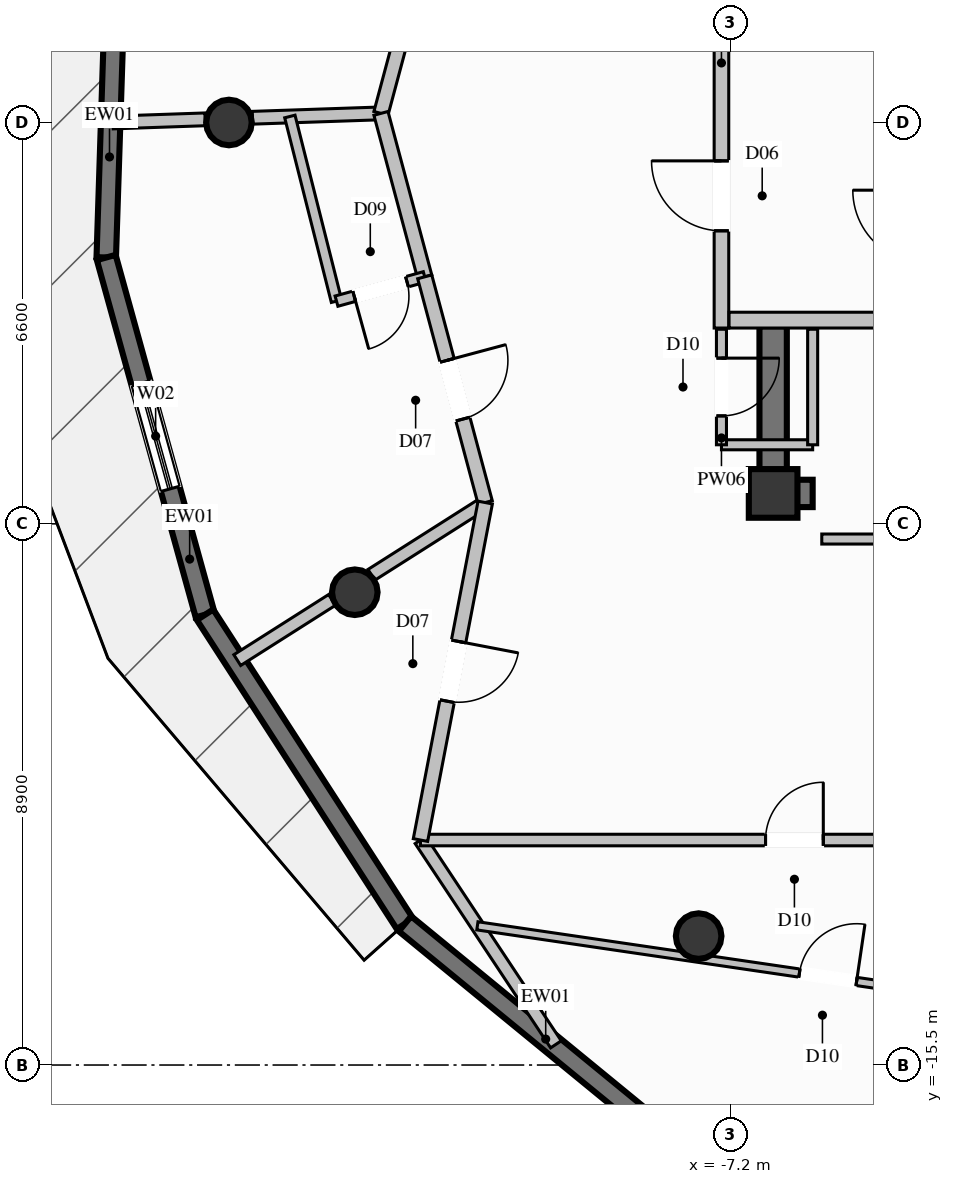
"""IFC4 building model, lengths in metres.
Left out: names, types, materials, properties, quantities, classifications, styles, units other than length and angle.
Written with IfcOpenShell. Run it as: python <this file> out.ifc"""

import sys

from ifc_helpers import new_model, si_unit, direction, frame, frame_2d, origin, origin_2d, place, context, subcontext, project, spatial, rectangle, circle, extrude, element, fill, save


model = new_model("IFC4")
c1 = context("Model", 3, precision=1e-05, world=origin(), true_north=direction((0.0, 1.0)))
c2 = subcontext(c1, "Body", "Model", "MODEL_VIEW")
j1 = project(units=[si_unit("LENGTHUNIT", "METRE"), si_unit("PLANEANGLEUNIT", "RADIAN")], contexts=[c1])
p1 = place(None, origin())
s1 = spatial("IfcSite", under=j1, at=p1, CompositionType="ELEMENT")
p2 = place(p1, origin())
s2 = spatial("IfcBuilding", under=s1, at=p2, CompositionType="ELEMENT")
p3 = place(p2, frame((0.0, 0.0, 258.2)))
s3 = spatial("IfcBuildingStorey", under=s2, at=p3, CompositionType="ELEMENT", Elevation=258.2)
p4 = place(p3, frame((-6.5, -6.1, 0.0), z_axis=(0.0, 0.0, 1.0), x_axis=(1.0, 0.0, 0.0)))
e1 = element("IfcColumn", 1, at=p4, inside=s3, PredefinedType="COLUMN", context=c2, shape_type="SweptSolid", body=[
    extrude(rectangle(XDim=0.8, YDim=0.8, at=origin_2d()), origin(), (0.0, 0.0, 1.0), 3.8),
])
p5 = place(p3, frame((-6.275, -6.1, 0.0), z_axis=(0.0, 0.0, 1.0), x_axis=(1.0, 0.0, 0.0)))
e2 = element("IfcWall", 2, at=p5, inside=s3, PredefinedType="SHEAR", context=c2, shape_type="SweptSolid", body=[
    extrude(rectangle(XDim=0.425, YDim=0.45, at=frame_2d((0.212, 0.0))), origin(), (0.0, 0.0, 1.0), 3.8),
])
p6 = place(p3, frame((-6.5, -6.325, 0.0), z_axis=(0.0, 0.0, 1.0), x_axis=(0.0, 1.0, 0.0)))
e3 = element("IfcWall", 3, at=p6, inside=s3, PredefinedType="SHEAR", context=c2, shape_type="SweptSolid", body=[
    extrude(rectangle(XDim=2.975, YDim=0.45, at=frame_2d((1.487, 0.0))), origin(), (0.0, 0.0, 1.0), 3.8),
])
for number, where, z_axis, x_axis in (
    (4, (-15.45, 0.0, 0.0), (0.0, 0.0, 1.0), (1.0, 0.0, 0.0)),
    (5, (-13.38, -7.725, 0.0), (0.0, 0.0, 1.0), (1.0, 0.0, 0.0)),
    (6, (-7.725, -13.38, 0.0), (0.0, 0.0, 1.0), (1.0, 0.0, 0.0)),
):
    element("IfcColumn", number, at=place(p3, frame(where, z_axis=z_axis, x_axis=x_axis)), inside=s3, PredefinedType="COLUMN", context=c2, shape_type="SweptSolid", body=[
        extrude(circle(Radius=0.375, at=origin_2d()), origin(), (0.0, 0.0, 1.0), 3.8),
    ])
p7 = place(p3, frame((-17.468, -2.22, 0.0), z_axis=(0.0, 0.0, 1.0), x_axis=(0.032483949851, 0.999472257245, 0.0)))
e7 = element("IfcWall", 7, at=p7, inside=s3, PredefinedType="SOLIDWALL", context=c2, shape_type="SweptSolid", body=[
    extrude(rectangle(XDim=6.095, YDim=0.32, at=frame_2d((3.048, 0.0))), origin(), (0.0, 0.0, 1.0), 3.57),
])
p8 = place(p7, frame((3.559, 0.0, 0.0)))
e8 = element("IfcOpeningElement", 8, at=p8, cuts=e7, PredefinedType="OPENING", context=c2, shape_type="SweptSolid", body=[
    extrude(rectangle(XDim=1.1, YDim=2.2, at=frame_2d((0.55, 1.1))), frame((0.0, 0.17, 0.0), z_axis=(0.0, -1.0, 0.0), x_axis=(1.0, 0.0, 0.0)), (0.0, 0.0, 1.0), 0.34),
])
p9 = place(p3, frame((-15.843, -8.095, 0.0), z_axis=(0.0, 0.0, 1.0), x_axis=(-0.266586054538, 0.963811120254, 0.0)))
e9 = element("IfcWall", 9, at=p9, inside=s3, PredefinedType="SOLIDWALL", context=c2, shape_type="SweptSolid", body=[
    extrude(rectangle(XDim=6.096, YDim=0.32, at=frame_2d((3.048, 0.0))), origin(), (0.0, 0.0, 1.0), 3.57),
])
p10 = place(p9, frame((2.148, 0.0, 0.35)))
e10 = element("IfcOpeningElement", 10, at=p10, cuts=e9, PredefinedType="OPENING", context=c2, shape_type="SweptSolid", body=[
    extrude(rectangle(XDim=1.8, YDim=2.6, at=frame_2d((0.9, 1.3))), frame((0.0, 0.17, 0.0), z_axis=(0.0, -1.0, 0.0), x_axis=(1.0, 0.0, 0.0)), (0.0, 0.0, 1.0), 0.34),
])
p11 = place(p3, frame((-12.555, -13.177, 0.0), z_axis=(0.0, 0.0, 1.0), x_axis=(-0.543217830049, 0.839591799101, 0.0)))
e11 = element("IfcWall", 11, at=p11, inside=s3, PredefinedType="SOLIDWALL", context=c2, shape_type="SweptSolid", body=[
    extrude(rectangle(XDim=6.053, YDim=0.32, at=frame_2d((3.026, 0.0))), origin(), (0.0, 0.0, 1.0), 3.57),
])
p12 = place(p3, frame((-7.926, -16.97, 0.0), z_axis=(0.0, 0.0, 1.0), x_axis=(-0.773491773729, 0.633806339486, 0.0)))
e12 = element("IfcWall", 12, at=p12, inside=s3, PredefinedType="SOLIDWALL", context=c2, shape_type="SweptSolid", body=[
    extrude(rectangle(XDim=5.984, YDim=0.32, at=frame_2d((2.992, 0.0))), origin(), (0.0, 0.0, 1.0), 3.57),
])
p13 = place(p3, frame((-7.35, -3.38, 0.0), z_axis=(0.0, 0.0, 1.0), x_axis=(0.0, 1.0, 0.0)))
e13 = element("IfcWall", 13, at=p13, inside=s3, PredefinedType="PARTITIONING", context=c2, shape_type="SweptSolid", body=[
    extrude(rectangle(XDim=5.72, YDim=0.24, at=frame_2d((2.86, 0.0))), origin(), (0.0, 0.0, 1.0), 2.655),
])
p14 = place(p13, frame((1.599, 0.0, 0.0)))
e14 = element("IfcOpeningElement", 14, at=p14, cuts=e13, PredefinedType="OPENING", context=c2, shape_type="SweptSolid", body=[
    extrude(rectangle(XDim=1.15, YDim=2.2, at=frame_2d((0.575, 1.1))), frame((0.0, 0.13, 0.0), z_axis=(0.0, -1.0, 0.0), x_axis=(1.0, 0.0, 0.0)), (0.0, 0.0, 1.0), 0.26),
])
p15 = place(p3, frame((-7.225, -3.25, 0.0), z_axis=(0.0, 0.0, 1.0), x_axis=(1.0, 0.0, 0.0)))
e15 = element("IfcWall", 15, at=p15, inside=s3, PredefinedType="PARTITIONING", context=c2, shape_type="SweptSolid", body=[
    extrude(rectangle(XDim=3.095, YDim=0.26, at=frame_2d((1.548, 0.0))), origin(), (0.0, 0.0, 1.0), 3.57),
])
p16 = place(p3, frame((-7.35, -5.3, 0.0), z_axis=(0.0, 0.0, 1.0), x_axis=(1.0, 0.0, 0.0)))
e16 = element("IfcWall", 16, at=p16, inside=s3, PredefinedType="PARTITIONING", context=c2, shape_type="SweptSolid", body=[
    extrude(rectangle(XDim=1.5, YDim=0.165, at=frame_2d((0.75, 0.0))), origin(), (0.0, 0.0, 1.0), 2.655),
])
p17 = place(p3, frame((-5.85, -5.3, 0.0), z_axis=(0.0, 0.0, 1.0), x_axis=(0.0, 1.0, 0.0)))
e17 = element("IfcWall", 17, at=p17, inside=s3, PredefinedType="PARTITIONING", context=c2, shape_type="SweptSolid", body=[
    extrude(rectangle(XDim=1.9, YDim=0.165, at=frame_2d((0.95, 0.0))), origin(), (0.0, 0.0, 1.0), 2.655),
])
p18 = place(p3, frame((-7.35, -3.4, 0.0), z_axis=(0.0, 0.0, 1.0), x_axis=(0.0, -1.0, 0.0)))
e18 = element("IfcWall", 18, at=p18, inside=s3, PredefinedType="PARTITIONING", context=c2, shape_type="SweptSolid", body=[
    extrude(rectangle(XDim=1.9, YDim=0.165, at=frame_2d((0.95, 0.0))), origin(), (0.0, 0.0, 1.0), 3.57),
])
p19 = place(p18, frame((0.475, 0.0, 0.0)))
e19 = element("IfcOpeningElement", 19, at=p19, cuts=e18, PredefinedType="OPENING", context=c2, shape_type="SweptSolid", body=[
    extrude(rectangle(XDim=0.95, YDim=2.1, at=frame_2d((0.475, 1.05))), frame((0.0, 0.093, 0.0), z_axis=(0.0, -1.0, 0.0), x_axis=(1.0, 0.0, 0.0)), (0.0, 0.0, 1.0), 0.185),
])
p20 = place(p3, frame((-5.7, -6.85, 0.0), z_axis=(0.0, 0.0, 1.0), x_axis=(1.0, 0.0, 0.0)))
e20 = element("IfcWall", 20, at=p20, inside=s3, PredefinedType="PARTITIONING", context=c2, shape_type="SweptSolid", body=[
    extrude(rectangle(XDim=6.55, YDim=0.165, at=frame_2d((3.275, 0.0))), origin(), (0.0, 0.0, 1.0), 2.655),
])
p21 = place(p20, frame((2.8, 0.0, 0.0)))
e21 = element("IfcOpeningElement", 21, at=p21, cuts=e20, PredefinedType="OPENING", context=c2, shape_type="SweptSolid", body=[
    extrude(rectangle(XDim=0.95, YDim=2.1, at=frame_2d((0.475, 1.05))), frame((0.0, 0.093, 0.0), z_axis=(0.0, -1.0, 0.0), x_axis=(1.0, 0.0, 0.0)), (0.0, 0.0, 1.0), 0.185),
])
p22 = place(p3, frame((-12.95, 0.15, 0.0), z_axis=(0.0, 0.0, 1.0), x_axis=(-0.999419634364, -0.034064562927, 0.0)))
e22 = element("IfcWall", 22, at=p22, inside=s3, PredefinedType="PARTITIONING", context=c2, shape_type="SweptSolid", body=[
    extrude(rectangle(XDim=2.114, YDim=0.21, at=frame_2d((1.057, 0.0))), origin(), (0.0, 0.0, 1.0), 3.57),
])
p23 = place(p3, frame((-15.842, 0.052, 0.0), z_axis=(0.0, 0.0, 1.0), x_axis=(-0.999410584372, -0.034329052487, 0.0)))
e23 = element("IfcWall", 23, at=p23, inside=s3, PredefinedType="PARTITIONING", context=c2, shape_type="SweptSolid", body=[
    extrude(rectangle(XDim=1.515, YDim=0.21, at=frame_2d((0.757, 0.0))), origin(), (0.0, 0.0, 1.0), 3.57),
])
p24 = place(p3, frame((-11.235, -6.25, 0.0), z_axis=(0.0, 0.0, 1.0), x_axis=(-0.844109998161, -0.536170039265, 0.0)))
e24 = element("IfcWall", 24, at=p24, inside=s3, PredefinedType="PARTITIONING", context=c2, shape_type="SweptSolid", body=[
    extrude(rectangle(XDim=2.218, YDim=0.21, at=frame_2d((1.109, 0.0))), origin(), (0.0, 0.0, 1.0), 3.085),
])
p25 = place(p3, frame((-13.754, -7.851, 0.0), z_axis=(0.0, 0.0, 1.0), x_axis=(-0.844189076995, -0.536045522583, 0.0)))
e25 = element("IfcWall", 25, at=p25, inside=s3, PredefinedType="PARTITIONING", context=c2, shape_type="SweptSolid", body=[
    extrude(rectangle(XDim=1.847, YDim=0.21, at=frame_2d((0.923, 0.0))), origin(), (0.0, 0.0, 1.0), 3.57),
])
p26 = place(p3, frame((-11.955, 3.862, 0.0), z_axis=(0.0, 0.0, 1.0), x_axis=(-0.258868389222, -0.965912603221, 0.0)))
e26 = element("IfcWall", 26, at=p26, inside=s3, PredefinedType="PARTITIONING", context=c2, shape_type="SweptSolid", body=[
    extrude(rectangle(XDim=3.843, YDim=0.24, at=frame_2d((1.922, 0.0))), origin(), (0.0, 0.0, 1.0), 3.57),
])
p27 = place(p26, frame((1.422, 0.0, 0.0)))
e27 = element("IfcOpeningElement", 27, at=p27, cuts=e26, PredefinedType="OPENING", context=c2, shape_type="SweptSolid", body=[
    extrude(rectangle(XDim=1.0, YDim=2.2, at=frame_2d((0.5, 1.1))), frame((0.0, 0.13, 0.0), z_axis=(0.0, -1.0, 0.0), x_axis=(1.0, 0.0, 0.0)), (0.0, 0.0, 1.0), 0.26),
])
p28 = place(p3, frame((-12.95, 0.15, 0.0), z_axis=(0.0, 0.0, 1.0), x_axis=(0.258727314432, -0.96595040078, 0.0)))
e28 = element("IfcWall", 28, at=p28, inside=s3, PredefinedType="PARTITIONING", context=c2, shape_type="SweptSolid", body=[
    extrude(rectangle(XDim=2.783, YDim=0.24, at=frame_2d((1.391, 0.0))), origin(), (0.0, 0.0, 1.0), 3.57),
])
p29 = place(p3, frame((-14.448, 0.099, 0.0), z_axis=(0.0, 0.0, 1.0), x_axis=(0.244882234228, -0.969552830618, 0.0)))
e29 = element("IfcWall", 29, at=p29, inside=s3, PredefinedType="PLUMBINGWALL", context=c2, shape_type="SweptSolid", body=[
    extrude(rectangle(XDim=3.133, YDim=0.175, at=frame_2d((1.566, 0.0))), origin(), (0.0, 0.0, 1.0), 3.57),
])
p30 = place(p3, frame((-12.23, -2.538, 0.0), z_axis=(0.0, 0.0, 1.0), x_axis=(-0.964052819731, -0.265710671162, 0.0)))
e30 = element("IfcWall", 30, at=p30, inside=s3, PredefinedType="PLUMBINGWALL", context=c2, shape_type="SweptSolid", body=[
    extrude(rectangle(XDim=1.505, YDim=0.175, at=frame_2d((0.752, 0.0))), origin(), (0.0, 0.0, 1.0), 3.57),
])
p31 = place(p30, frame((0.303, 0.0, 0.0)))
e31 = element("IfcOpeningElement", 31, at=p31, cuts=e30, PredefinedType="OPENING", context=c2, shape_type="SweptSolid", body=[
    extrude(rectangle(XDim=0.9, YDim=2.1, at=frame_2d((0.45, 1.05))), frame((0.0, 0.098, 0.0), z_axis=(0.0, -1.0, 0.0), x_axis=(1.0, 0.0, 0.0)), (0.0, 0.0, 1.0), 0.195),
])
p32 = place(p3, frame((-12.23, -2.538, 0.0), z_axis=(0.0, 0.0, 1.0), x_axis=(0.258884274469, -0.965908345772, 0.0)))
e32 = element("IfcWall", 32, at=p32, inside=s3, PredefinedType="PARTITIONING", context=c2, shape_type="SweptSolid", body=[
    extrude(rectangle(XDim=3.843, YDim=0.24, at=frame_2d((1.921, 0.0))), origin(), (0.0, 0.0, 1.0), 3.57),
])
p33 = place(p32, frame((1.422, 0.0, 0.0)))
e33 = element("IfcOpeningElement", 33, at=p33, cuts=e32, PredefinedType="OPENING", context=c2, shape_type="SweptSolid", body=[
    extrude(rectangle(XDim=1.0, YDim=2.2, at=frame_2d((0.5, 1.1))), frame((0.0, 0.13, 0.0), z_axis=(0.0, -1.0, 0.0), x_axis=(1.0, 0.0, 0.0)), (0.0, 0.0, 1.0), 0.26),
])
p34 = place(p3, frame((-12.3, -11.8, 0.0), z_axis=(0.0, 0.0, 1.0), x_axis=(0.552658168023, -0.833408032909, 0.0)))
e34 = element("IfcWall", 34, at=p34, inside=s3, PredefinedType="PARTITIONING", context=c2, shape_type="SweptSolid", body=[
    extrude(rectangle(XDim=4.031, YDim=0.21, at=frame_2d((2.016, 0.0))), origin(), (0.0, 0.0, 1.0), 3.57),
])
p35 = place(p3, frame((-12.3, -11.8, 0.0), z_axis=(0.0, 0.0, 1.0), x_axis=(1.0, 0.0, 0.0)))
e35 = element("IfcWall", 35, at=p35, inside=s3, PredefinedType="PARTITIONING", context=c2, shape_type="SweptSolid", body=[
    extrude(rectangle(XDim=12.3, YDim=0.19, at=frame_2d((6.15, 0.0))), origin(), (0.0, 0.0, 1.0), 3.57),
])
p36 = place(p35, frame((5.675, 0.0, 0.0)))
e36 = element("IfcOpeningElement", 36, at=p36, cuts=e35, PredefinedType="OPENING", context=c2, shape_type="SweptSolid", body=[
    extrude(rectangle(XDim=0.95, YDim=2.1, at=frame_2d((0.475, 1.05))), frame((0.0, 0.105, 0.0), z_axis=(0.0, -1.0, 0.0), x_axis=(1.0, 0.0, 0.0)), (0.0, 0.0, 1.0), 0.21),
])
p37 = place(p3, frame((-11.235, -6.25, 0.0), z_axis=(0.0, 0.0, 1.0), x_axis=(-0.18844199237, -0.982084321997, 0.0)))
e37 = element("IfcWall", 37, at=p37, inside=s3, PredefinedType="PARTITIONING", context=c2, shape_type="SweptSolid", body=[
    extrude(rectangle(XDim=5.651, YDim=0.24, at=frame_2d((2.826, 0.0))), origin(), (0.0, 0.0, 1.0), 3.57),
])
p38 = place(p37, frame((2.326, 0.0, 0.0)))
e38 = element("IfcOpeningElement", 38, at=p38, cuts=e37, PredefinedType="OPENING", context=c2, shape_type="SweptSolid", body=[
    extrude(rectangle(XDim=1.0, YDim=2.2, at=frame_2d((0.5, 1.1))), frame((0.0, 0.13, 0.0), z_axis=(0.0, -1.0, 0.0), x_axis=(1.0, 0.0, 0.0)), (0.0, 0.0, 1.0), 0.26),
])
p39 = place(p3, frame((-11.364, -13.211, 0.0), z_axis=(0.0, 0.0, 1.0), x_axis=(0.989407054011, -0.145167770091, 0.0)))
e39 = element("IfcWall", 39, at=p39, inside=s3, PredefinedType="PARTITIONING", context=c2, shape_type="SweptSolid", body=[
    extrude(rectangle(XDim=11.656, YDim=0.135, at=frame_2d((5.828, 0.0))), origin(), (0.0, 0.0, 1.0), 3.137),
])
p40 = place(p39, frame((5.353, 0.0, 0.0)))
e40 = element("IfcOpeningElement", 40, at=p40, cuts=e39, PredefinedType="OPENING", context=c2, shape_type="SweptSolid", body=[
    extrude(rectangle(XDim=0.95, YDim=2.1, at=frame_2d((0.475, 1.05))), frame((0.0, 0.078, 0.0), z_axis=(0.0, -1.0, 0.0), x_axis=(1.0, 0.0, 0.0)), (0.0, 0.0, 1.0), 0.155),
])
p41 = place(p10, origin())
e41 = element("IfcWindow", 41, at=p41, inside=s3, PartitioningType="SINGLE_PANEL", PredefinedType="WINDOW", context=c2, shape_type="SweptSolid", body=[
    extrude(rectangle(XDim=1.8, YDim=2.6, at=frame_2d((0.9, 1.3))), frame((0.0, 0.03, 0.0), z_axis=(0.0, -1.0, 0.0), x_axis=(1.0, 0.0, 0.0)), (0.0, 0.0, 1.0), 0.06),
])
fill(e10, e41)
p42 = place(p14, origin())
e42 = element("IfcDoor", 42, at=p42, inside=s3, OperationType="SINGLE_SWING_RIGHT", PredefinedType="DOOR", context=c2, shape_type="SweptSolid", body=[
    extrude(rectangle(XDim=1.15, YDim=2.2, at=frame_2d((0.575, 1.1))), frame((0.0, 0.025, 0.0), z_axis=(0.0, -1.0, 0.0), x_axis=(1.0, 0.0, 0.0)), (0.0, 0.0, 1.0), 0.05),
])
fill(e14, e42)
p43 = place(p19, origin())
e43 = element("IfcDoor", 43, at=p43, inside=s3, OperationType="SINGLE_SWING_LEFT", PredefinedType="DOOR", context=c2, shape_type="SweptSolid", body=[
    extrude(rectangle(XDim=0.95, YDim=2.1, at=frame_2d((0.475, 1.05))), frame((0.0, 0.025, 0.0), z_axis=(0.0, -1.0, 0.0), x_axis=(1.0, 0.0, 0.0)), (0.0, 0.0, 1.0), 0.05),
])
fill(e19, e43)
p44 = place(p31, origin())
e44 = element("IfcDoor", 44, at=p44, inside=s3, OperationType="SINGLE_SWING_RIGHT", PredefinedType="DOOR", context=c2, shape_type="SweptSolid", body=[
    extrude(rectangle(XDim=0.9, YDim=2.1, at=frame_2d((0.45, 1.05))), frame((0.0, 0.025, 0.0), z_axis=(0.0, -1.0, 0.0), x_axis=(1.0, 0.0, 0.0)), (0.0, 0.0, 1.0), 0.05),
])
fill(e31, e44)
p45 = place(p33, origin())
e45 = element("IfcDoor", 45, at=p45, inside=s3, OperationType="SINGLE_SWING_LEFT", PredefinedType="DOOR", context=c2, shape_type="SweptSolid", body=[
    extrude(rectangle(XDim=1.0, YDim=2.2, at=frame_2d((0.5, 1.1))), frame((0.0, 0.025, 0.0), z_axis=(0.0, -1.0, 0.0), x_axis=(1.0, 0.0, 0.0)), (0.0, 0.0, 1.0), 0.05),
])
fill(e33, e45)
p46 = place(p36, origin())
e46 = element("IfcDoor", 46, at=p46, inside=s3, OperationType="SINGLE_SWING_RIGHT", PredefinedType="DOOR", context=c2, shape_type="SweptSolid", body=[
    extrude(rectangle(XDim=0.95, YDim=2.1, at=frame_2d((0.475, 1.05))), frame((0.0, 0.025, 0.0), z_axis=(0.0, -1.0, 0.0), x_axis=(1.0, 0.0, 0.0)), (0.0, 0.0, 1.0), 0.05),
])
fill(e36, e46)
p47 = place(p38, origin())
e47 = element("IfcDoor", 47, at=p47, inside=s3, OperationType="SINGLE_SWING_LEFT", PredefinedType="DOOR", context=c2, shape_type="SweptSolid", body=[
    extrude(rectangle(XDim=1.0, YDim=2.2, at=frame_2d((0.5, 1.1))), frame((0.0, 0.025, 0.0), z_axis=(0.0, -1.0, 0.0), x_axis=(1.0, 0.0, 0.0)), (0.0, 0.0, 1.0), 0.05),
])
fill(e38, e47)
p48 = place(p40, origin())
e48 = element("IfcDoor", 48, at=p48, inside=s3, OperationType="SINGLE_SWING_RIGHT", PredefinedType="DOOR", context=c2, shape_type="SweptSolid", body=[
    extrude(rectangle(XDim=0.95, YDim=2.1, at=frame_2d((0.475, 1.05))), frame((0.0, 0.025, 0.0), z_axis=(0.0, -1.0, 0.0), x_axis=(1.0, 0.0, 0.0)), (0.0, 0.0, 1.0), 0.05),
])
fill(e40, e48)
save(model, sys.argv[1])
